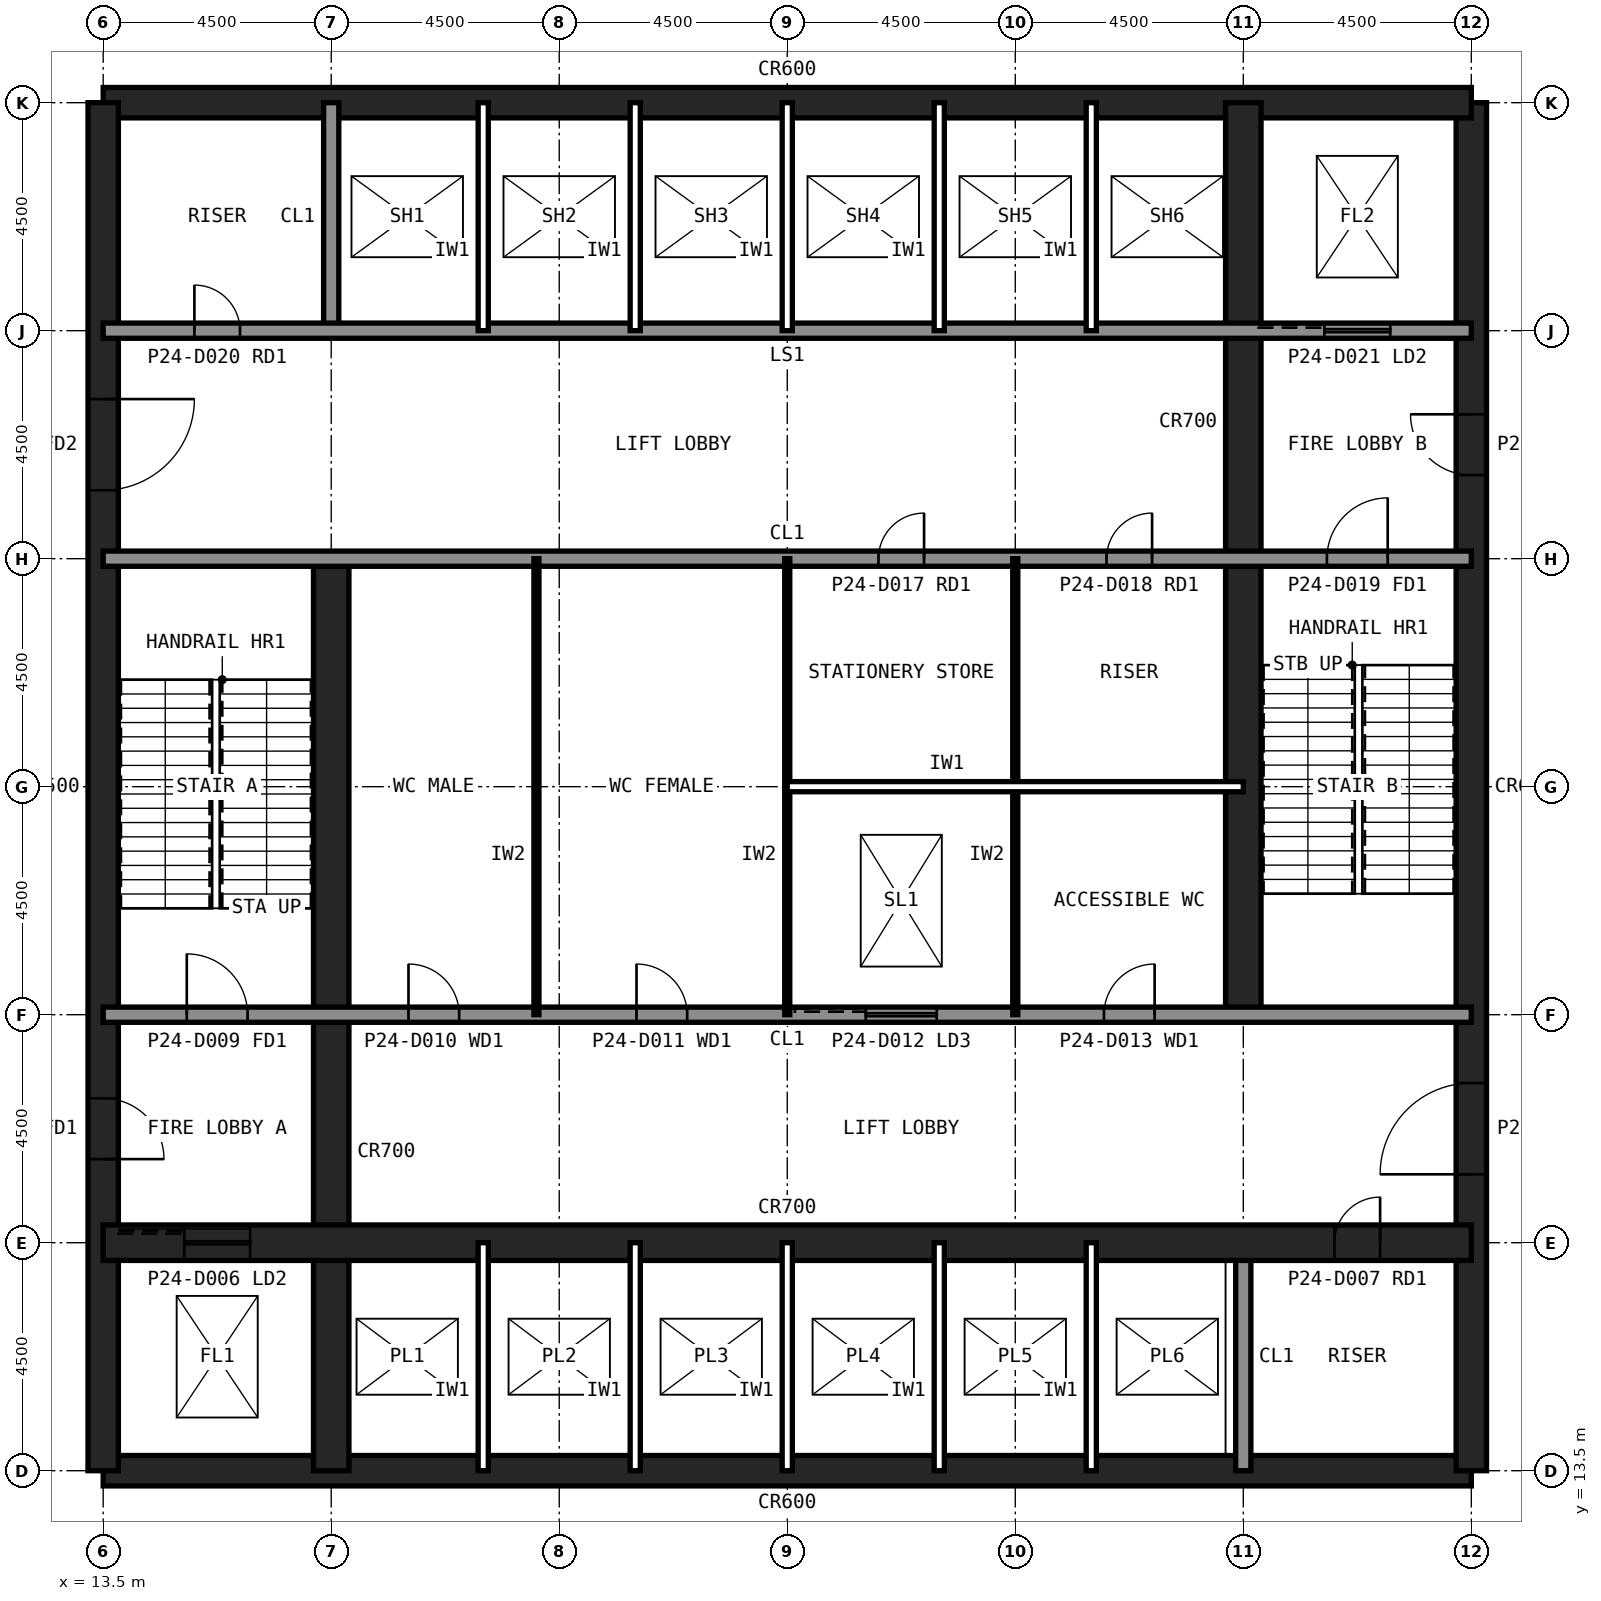
"""IFC4 building model, lengths in metres.
Left out: names, types, materials, properties, quantities, classifications, styles, units other than length and angle.
Written with IfcOpenShell. Run it as: python <this file> out.ifc"""

import sys

from ifc_helpers import new_model, si_unit, direction, frame, frame_2d, origin, place, context, subcontext, project, spatial, rectangle, extrude, element, fill, save


model = new_model("IFC4")
c1 = context("Model", 3, precision=1e-05, world=origin(), true_north=direction((0.0, 1.0)))
c2 = subcontext(c1, "Body", "Model", "MODEL_VIEW")
j1 = project(units=[si_unit("LENGTHUNIT", "METRE"), si_unit("PLANEANGLEUNIT", "RADIAN")], contexts=[c1])
p1 = place(None, origin())
s1 = spatial("IfcSite", under=j1, at=p1, CompositionType="ELEMENT")
p2 = place(p1, origin())
s2 = spatial("IfcBuilding", under=s1, at=p2, CompositionType="ELEMENT")
p3 = place(p2, frame((0.0, 0.0, 104.6)))
s3 = spatial("IfcBuildingStorey", under=s2, at=p3, CompositionType="ELEMENT", Elevation=104.6)
p4 = place(p3, frame((13.5, 13.5, 0.0), z_axis=(0.0, 0.0, 1.0), x_axis=(1.0, 0.0, 0.0)))
e1 = element("IfcWall", 1, at=p4, inside=s3, PredefinedType="SHEAR", context=c2, shape_type="SweptSolid", body=[
    extrude(rectangle(XDim=27.0, YDim=0.6, at=frame_2d((13.5, 0.0))), origin(), (0.0, 0.0, 1.0), 6.0),
])
p5 = place(p3, frame((40.5, 13.5, 0.0), z_axis=(0.0, 0.0, 1.0), x_axis=(0.0, 1.0, 0.0)))
e2 = element("IfcWall", 2, at=p5, inside=s3, PredefinedType="SHEAR", context=c2, shape_type="SweptSolid", body=[
    extrude(rectangle(XDim=27.0, YDim=0.6, at=frame_2d((13.5, 0.0))), origin(), (0.0, 0.0, 1.0), 6.0),
])
p6 = place(p5, frame((5.85, 0.0, 0.0)))
e3 = element("IfcOpeningElement", 3, at=p6, cuts=e2, PredefinedType="OPENING", context=c2, shape_type="SweptSolid", body=[
    extrude(rectangle(XDim=1.8, YDim=2.1, at=frame_2d((0.9, 1.05))), frame((0.0, 0.31, 0.0), z_axis=(0.0, -1.0, 0.0), x_axis=(1.0, 0.0, 0.0)), (0.0, 0.0, 1.0), 0.62),
])
p7 = place(p5, frame((19.65, 0.0, 0.0)))
e4 = element("IfcOpeningElement", 4, at=p7, cuts=e2, PredefinedType="OPENING", context=c2, shape_type="SweptSolid", body=[
    extrude(rectangle(XDim=1.2, YDim=2.1, at=frame_2d((0.6, 1.05))), frame((0.0, 0.31, 0.0), z_axis=(0.0, -1.0, 0.0), x_axis=(1.0, 0.0, 0.0)), (0.0, 0.0, 1.0), 0.62),
])
p8 = place(p3, frame((40.5, 40.5, 0.0), z_axis=(0.0, 0.0, 1.0), x_axis=(-1.0, 0.0, 0.0)))
e5 = element("IfcWall", 5, at=p8, inside=s3, PredefinedType="SHEAR", context=c2, shape_type="SweptSolid", body=[
    extrude(rectangle(XDim=27.0, YDim=0.6, at=frame_2d((13.5, 0.0))), origin(), (0.0, 0.0, 1.0), 6.0),
])
p9 = place(p3, frame((13.5, 40.5, 0.0), z_axis=(0.0, 0.0, 1.0), x_axis=(0.0, -1.0, 0.0)))
e6 = element("IfcWall", 6, at=p9, inside=s3, PredefinedType="SHEAR", context=c2, shape_type="SweptSolid", body=[
    extrude(rectangle(XDim=27.0, YDim=0.6, at=frame_2d((13.5, 0.0))), origin(), (0.0, 0.0, 1.0), 6.0),
])
p10 = place(p9, frame((19.65, 0.0, 0.0)))
e7 = element("IfcOpeningElement", 7, at=p10, cuts=e6, PredefinedType="OPENING", context=c2, shape_type="SweptSolid", body=[
    extrude(rectangle(XDim=1.2, YDim=2.1, at=frame_2d((0.6, 1.05))), frame((0.0, 0.31, 0.0), z_axis=(0.0, -1.0, 0.0), x_axis=(1.0, 0.0, 0.0)), (0.0, 0.0, 1.0), 0.62),
])
p11 = place(p9, frame((5.85, 0.0, 0.0)))
e8 = element("IfcOpeningElement", 8, at=p11, cuts=e6, PredefinedType="OPENING", context=c2, shape_type="SweptSolid", body=[
    extrude(rectangle(XDim=1.8, YDim=2.1, at=frame_2d((0.9, 1.05))), frame((0.0, 0.31, 0.0), z_axis=(0.0, -1.0, 0.0), x_axis=(1.0, 0.0, 0.0)), (0.0, 0.0, 1.0), 0.62),
])
p12 = place(p3, frame((18.0, 13.5, 0.0), z_axis=(0.0, 0.0, 1.0), x_axis=(0.0, 1.0, 0.0)))
e9 = element("IfcWall", 9, at=p12, inside=s3, PredefinedType="SHEAR", context=c2, shape_type="SweptSolid", body=[
    extrude(rectangle(XDim=18.0, YDim=0.7, at=frame_2d((9.0, 0.0))), origin(), (0.0, 0.0, 1.0), 6.0),
])
for number, where, z_axis, x_axis in (
    (10, (18.0, 36.0, 0.0), (0.0, 0.0, 1.0), (0.0, 1.0, 0.0)),
    (11, (36.0, 13.5, 0.0), (0.0, 0.0, 1.0), (0.0, 1.0, 0.0)),
):
    element("IfcWall", number, at=place(p3, frame(where, z_axis=z_axis, x_axis=x_axis)), inside=s3, PredefinedType="SOLIDWALL", context=c2, shape_type="SweptSolid", body=[
        extrude(rectangle(XDim=4.5, YDim=0.3, at=frame_2d((2.25, 0.0))), origin(), (0.0, 0.0, 1.0), 5.82),
    ])
p13 = place(p3, frame((36.0, 22.5, 0.0), z_axis=(0.0, 0.0, 1.0), x_axis=(0.0, 1.0, 0.0)))
e12 = element("IfcWall", 12, at=p13, inside=s3, PredefinedType="SHEAR", context=c2, shape_type="SweptSolid", body=[
    extrude(rectangle(XDim=18.0, YDim=0.7, at=frame_2d((9.0, 0.0))), origin(), (0.0, 0.0, 1.0), 6.0),
])
p14 = place(p3, frame((13.5, 18.0, 0.0), z_axis=(0.0, 0.0, 1.0), x_axis=(1.0, 0.0, 0.0)))
e13 = element("IfcWall", 13, at=p14, inside=s3, PredefinedType="SHEAR", context=c2, shape_type="SweptSolid", body=[
    extrude(rectangle(XDim=27.0, YDim=0.7, at=frame_2d((13.5, 0.0))), origin(), (0.0, 0.0, 1.0), 6.0),
])
p15 = place(p14, frame((24.3, 0.0, 0.0)))
e14 = element("IfcOpeningElement", 14, at=p15, cuts=e13, PredefinedType="OPENING", context=c2, shape_type="SweptSolid", body=[
    extrude(rectangle(XDim=0.9, YDim=2.1, at=frame_2d((0.45, 1.05))), frame((0.0, 0.36, 0.0), z_axis=(0.0, -1.0, 0.0), x_axis=(1.0, 0.0, 0.0)), (0.0, 0.0, 1.0), 0.72),
])
p16 = place(p14, frame((1.6, 0.0, 0.0)))
e15 = element("IfcOpeningElement", 15, at=p16, cuts=e13, PredefinedType="OPENING", context=c2, shape_type="SweptSolid", body=[
    extrude(rectangle(XDim=1.3, YDim=2.2, at=frame_2d((0.65, 1.1))), frame((0.0, 0.36, 0.0), z_axis=(0.0, -1.0, 0.0), x_axis=(1.0, 0.0, 0.0)), (0.0, 0.0, 1.0), 0.72),
])
p17 = place(p3, frame((13.5, 36.0, 0.0), z_axis=(0.0, 0.0, 1.0), x_axis=(1.0, 0.0, 0.0)))
e16 = element("IfcWall", 16, at=p17, inside=s3, PredefinedType="SOLIDWALL", context=c2, shape_type="SweptSolid", body=[
    extrude(rectangle(XDim=27.0, YDim=0.3, at=frame_2d((13.5, 0.0))), origin(), (0.0, 0.0, 1.0), 5.82),
])
p18 = place(p17, frame((1.8, 0.0, 0.0)))
e17 = element("IfcOpeningElement", 17, at=p18, cuts=e16, PredefinedType="OPENING", context=c2, shape_type="SweptSolid", body=[
    extrude(rectangle(XDim=0.9, YDim=2.1, at=frame_2d((0.45, 1.05))), frame((0.0, 0.16, 0.0), z_axis=(0.0, -1.0, 0.0), x_axis=(1.0, 0.0, 0.0)), (0.0, 0.0, 1.0), 0.32),
])
p19 = place(p17, frame((24.1, 0.0, 0.0)))
e18 = element("IfcOpeningElement", 18, at=p19, cuts=e16, PredefinedType="OPENING", context=c2, shape_type="SweptSolid", body=[
    extrude(rectangle(XDim=1.3, YDim=2.2, at=frame_2d((0.65, 1.1))), frame((0.0, 0.16, 0.0), z_axis=(0.0, -1.0, 0.0), x_axis=(1.0, 0.0, 0.0)), (0.0, 0.0, 1.0), 0.32),
])
p20 = place(p3, frame((13.5, 22.5, 0.0), z_axis=(0.0, 0.0, 1.0), x_axis=(1.0, 0.0, 0.0)))
e19 = element("IfcWall", 19, at=p20, inside=s3, PredefinedType="SOLIDWALL", context=c2, shape_type="SweptSolid", body=[
    extrude(rectangle(XDim=27.0, YDim=0.3, at=frame_2d((13.5, 0.0))), origin(), (0.0, 0.0, 1.0), 5.82),
])
p21 = place(p20, frame((1.65, 0.0, 0.0)))
e20 = element("IfcOpeningElement", 20, at=p21, cuts=e19, PredefinedType="OPENING", context=c2, shape_type="SweptSolid", body=[
    extrude(rectangle(XDim=1.2, YDim=2.1, at=frame_2d((0.6, 1.05))), frame((0.0, 0.16, 0.0), z_axis=(0.0, -1.0, 0.0), x_axis=(1.0, 0.0, 0.0)), (0.0, 0.0, 1.0), 0.32),
])
p22 = place(p20, frame((6.025, 0.0, 0.0)))
e21 = element("IfcOpeningElement", 21, at=p22, cuts=e19, PredefinedType="OPENING", context=c2, shape_type="SweptSolid", body=[
    extrude(rectangle(XDim=1.0, YDim=2.1, at=frame_2d((0.5, 1.05))), frame((0.0, 0.16, 0.0), z_axis=(0.0, -1.0, 0.0), x_axis=(1.0, 0.0, 0.0)), (0.0, 0.0, 1.0), 0.32),
])
p23 = place(p20, frame((10.525, 0.0, 0.0)))
e22 = element("IfcOpeningElement", 22, at=p23, cuts=e19, PredefinedType="OPENING", context=c2, shape_type="SweptSolid", body=[
    extrude(rectangle(XDim=1.0, YDim=2.1, at=frame_2d((0.5, 1.05))), frame((0.0, 0.16, 0.0), z_axis=(0.0, -1.0, 0.0), x_axis=(1.0, 0.0, 0.0)), (0.0, 0.0, 1.0), 0.32),
])
p24 = place(p20, frame((19.75, 0.0, 0.0)))
e23 = element("IfcOpeningElement", 23, at=p24, cuts=e19, PredefinedType="OPENING", context=c2, shape_type="SweptSolid", body=[
    extrude(rectangle(XDim=1.0, YDim=2.1, at=frame_2d((0.5, 1.05))), frame((0.0, 0.16, 0.0), z_axis=(0.0, -1.0, 0.0), x_axis=(1.0, 0.0, 0.0)), (0.0, 0.0, 1.0), 0.32),
])
p25 = place(p20, frame((15.05, 0.0, 0.0)))
e24 = element("IfcOpeningElement", 24, at=p25, cuts=e19, PredefinedType="OPENING", context=c2, shape_type="SweptSolid", body=[
    extrude(rectangle(XDim=1.4, YDim=2.4, at=frame_2d((0.7, 1.2))), frame((0.0, 0.16, 0.0), z_axis=(0.0, -1.0, 0.0), x_axis=(1.0, 0.0, 0.0)), (0.0, 0.0, 1.0), 0.32),
])
p26 = place(p3, frame((13.5, 31.5, 0.0), z_axis=(0.0, 0.0, 1.0), x_axis=(1.0, 0.0, 0.0)))
e25 = element("IfcWall", 25, at=p26, inside=s3, PredefinedType="SOLIDWALL", context=c2, shape_type="SweptSolid", body=[
    extrude(rectangle(XDim=27.0, YDim=0.3, at=frame_2d((13.5, 0.0))), origin(), (0.0, 0.0, 1.0), 5.82),
])
p27 = place(p26, frame((24.15, 0.0, 0.0)))
e26 = element("IfcOpeningElement", 26, at=p27, cuts=e25, PredefinedType="OPENING", context=c2, shape_type="SweptSolid", body=[
    extrude(rectangle(XDim=1.2, YDim=2.1, at=frame_2d((0.6, 1.05))), frame((0.0, 0.16, 0.0), z_axis=(0.0, -1.0, 0.0), x_axis=(1.0, 0.0, 0.0)), (0.0, 0.0, 1.0), 0.32),
])
p28 = place(p26, frame((15.3, 0.0, 0.0)))
e27 = element("IfcOpeningElement", 27, at=p28, cuts=e25, PredefinedType="OPENING", context=c2, shape_type="SweptSolid", body=[
    extrude(rectangle(XDim=0.9, YDim=2.1, at=frame_2d((0.45, 1.05))), frame((0.0, 0.16, 0.0), z_axis=(0.0, -1.0, 0.0), x_axis=(1.0, 0.0, 0.0)), (0.0, 0.0, 1.0), 0.32),
])
p29 = place(p26, frame((19.8, 0.0, 0.0)))
e28 = element("IfcOpeningElement", 28, at=p29, cuts=e25, PredefinedType="OPENING", context=c2, shape_type="SweptSolid", body=[
    extrude(rectangle(XDim=0.9, YDim=2.1, at=frame_2d((0.45, 1.05))), frame((0.0, 0.16, 0.0), z_axis=(0.0, -1.0, 0.0), x_axis=(1.0, 0.0, 0.0)), (0.0, 0.0, 1.0), 0.32),
])
for number, where, z_axis, x_axis in (
    (29, (21.0, 13.5, 0.0), (0.0, 0.0, 1.0), (0.0, 1.0, 0.0)),
    (30, (21.0, 36.0, 0.0), (0.0, 0.0, 1.0), (0.0, 1.0, 0.0)),
    (31, (24.0, 13.5, 0.0), (0.0, 0.0, 1.0), (0.0, 1.0, 0.0)),
    (32, (24.0, 36.0, 0.0), (0.0, 0.0, 1.0), (0.0, 1.0, 0.0)),
    (33, (27.0, 13.5, 0.0), (0.0, 0.0, 1.0), (0.0, 1.0, 0.0)),
    (34, (27.0, 36.0, 0.0), (0.0, 0.0, 1.0), (0.0, 1.0, 0.0)),
    (35, (30.0, 13.5, 0.0), (0.0, 0.0, 1.0), (0.0, 1.0, 0.0)),
    (36, (30.0, 36.0, 0.0), (0.0, 0.0, 1.0), (0.0, 1.0, 0.0)),
    (37, (33.0, 13.5, 0.0), (0.0, 0.0, 1.0), (0.0, 1.0, 0.0)),
    (38, (33.0, 36.0, 0.0), (0.0, 0.0, 1.0), (0.0, 1.0, 0.0)),
):
    element("IfcWall", number, at=place(p3, frame(where, z_axis=z_axis, x_axis=x_axis)), inside=s3, PredefinedType="PARTITIONING", context=c2, shape_type="SweptSolid", body=[
        extrude(rectangle(XDim=4.5, YDim=0.2, at=frame_2d((2.25, 0.0))), origin(), (0.0, 0.0, 1.0), 5.82),
    ])
for number, where, z_axis, x_axis in (
    (39, (22.05, 22.5, 0.0), (0.0, 0.0, 1.0), (0.0, 1.0, 0.0)),
    (40, (27.0, 22.5, 0.0), (0.0, 0.0, 1.0), (0.0, 1.0, 0.0)),
    (41, (31.5, 22.5, 0.0), (0.0, 0.0, 1.0), (0.0, 1.0, 0.0)),
):
    element("IfcWall", number, at=place(p3, frame(where, z_axis=z_axis, x_axis=x_axis)), inside=s3, PredefinedType="PLUMBINGWALL", context=c2, shape_type="SweptSolid", body=[
        extrude(rectangle(XDim=9.0, YDim=0.1, at=frame_2d((4.5, 0.0))), origin(), (0.0, 0.0, 1.0), 5.82),
    ])
p30 = place(p3, frame((27.0, 27.0, 0.0), z_axis=(0.0, 0.0, 1.0), x_axis=(1.0, 0.0, 0.0)))
e42 = element("IfcWall", 42, at=p30, inside=s3, PredefinedType="PARTITIONING", context=c2, shape_type="SweptSolid", body=[
    extrude(rectangle(XDim=9.0, YDim=0.2, at=frame_2d((4.5, 0.0))), origin(), (0.0, 0.0, 1.0), 5.82),
])
p31 = place(p10, origin())
e43 = element("IfcDoor", 43, at=p31, inside=s3, OperationType="SINGLE_SWING_RIGHT", PredefinedType="DOOR", context=c2, shape_type="SweptSolid", body=[
    extrude(rectangle(XDim=1.2, YDim=2.1, at=frame_2d((0.6, 1.05))), frame((0.0, 0.025, 0.0), z_axis=(0.0, -1.0, 0.0), x_axis=(1.0, 0.0, 0.0)), (0.0, 0.0, 1.0), 0.05),
])
fill(e7, e43)
p32 = place(p11, origin())
e44 = element("IfcDoor", 44, at=p32, inside=s3, OperationType="SINGLE_SWING_LEFT", PredefinedType="DOOR", context=c2, shape_type="SweptSolid", body=[
    extrude(rectangle(XDim=1.8, YDim=2.1, at=frame_2d((0.9, 1.05))), frame((0.0, 0.025, 0.0), z_axis=(0.0, -1.0, 0.0), x_axis=(1.0, 0.0, 0.0)), (0.0, 0.0, 1.0), 0.05),
])
fill(e8, e44)
p33 = place(p6, origin())
e45 = element("IfcDoor", 45, at=p33, inside=s3, OperationType="SINGLE_SWING_LEFT", PredefinedType="DOOR", context=c2, shape_type="SweptSolid", body=[
    extrude(rectangle(XDim=1.8, YDim=2.1, at=frame_2d((0.9, 1.05))), frame((0.0, 0.025, 0.0), z_axis=(0.0, -1.0, 0.0), x_axis=(1.0, 0.0, 0.0)), (0.0, 0.0, 1.0), 0.05),
])
fill(e3, e45)
p34 = place(p7, origin())
e46 = element("IfcDoor", 46, at=p34, inside=s3, OperationType="SINGLE_SWING_RIGHT", PredefinedType="DOOR", context=c2, shape_type="SweptSolid", body=[
    extrude(rectangle(XDim=1.2, YDim=2.1, at=frame_2d((0.6, 1.05))), frame((0.0, 0.025, 0.0), z_axis=(0.0, -1.0, 0.0), x_axis=(1.0, 0.0, 0.0)), (0.0, 0.0, 1.0), 0.05),
])
fill(e4, e46)
p35 = place(p21, origin())
e47 = element("IfcDoor", 47, at=p35, inside=s3, OperationType="SINGLE_SWING_LEFT", PredefinedType="DOOR", context=c2, shape_type="SweptSolid", body=[
    extrude(rectangle(XDim=1.2, YDim=2.1, at=frame_2d((0.6, 1.05))), frame((0.0, 0.025, 0.0), z_axis=(0.0, -1.0, 0.0), x_axis=(1.0, 0.0, 0.0)), (0.0, 0.0, 1.0), 0.05),
])
fill(e20, e47)
p36 = place(p27, origin())
e48 = element("IfcDoor", 48, at=p36, inside=s3, OperationType="SINGLE_SWING_RIGHT", PredefinedType="DOOR", context=c2, shape_type="SweptSolid", body=[
    extrude(rectangle(XDim=1.2, YDim=2.1, at=frame_2d((0.6, 1.05))), frame((0.0, 0.025, 0.0), z_axis=(0.0, -1.0, 0.0), x_axis=(1.0, 0.0, 0.0)), (0.0, 0.0, 1.0), 0.05),
])
fill(e26, e48)
p37 = place(p22, origin())
e49 = element("IfcDoor", 49, at=p37, inside=s3, OperationType="SINGLE_SWING_LEFT", PredefinedType="DOOR", context=c2, shape_type="SweptSolid", body=[
    extrude(rectangle(XDim=1.0, YDim=2.1, at=frame_2d((0.5, 1.05))), frame((0.0, 0.025, 0.0), z_axis=(0.0, -1.0, 0.0), x_axis=(1.0, 0.0, 0.0)), (0.0, 0.0, 1.0), 0.05),
])
fill(e21, e49)
p38 = place(p23, origin())
e50 = element("IfcDoor", 50, at=p38, inside=s3, OperationType="SINGLE_SWING_LEFT", PredefinedType="DOOR", context=c2, shape_type="SweptSolid", body=[
    extrude(rectangle(XDim=1.0, YDim=2.1, at=frame_2d((0.5, 1.05))), frame((0.0, 0.025, 0.0), z_axis=(0.0, -1.0, 0.0), x_axis=(1.0, 0.0, 0.0)), (0.0, 0.0, 1.0), 0.05),
])
fill(e22, e50)
p39 = place(p24, origin())
e51 = element("IfcDoor", 51, at=p39, inside=s3, OperationType="SINGLE_SWING_RIGHT", PredefinedType="DOOR", context=c2, shape_type="SweptSolid", body=[
    extrude(rectangle(XDim=1.0, YDim=2.1, at=frame_2d((0.5, 1.05))), frame((0.0, 0.025, 0.0), z_axis=(0.0, -1.0, 0.0), x_axis=(1.0, 0.0, 0.0)), (0.0, 0.0, 1.0), 0.05),
])
fill(e23, e51)
p40 = place(p28, origin())
e52 = element("IfcDoor", 52, at=p40, inside=s3, OperationType="SINGLE_SWING_RIGHT", PredefinedType="DOOR", context=c2, shape_type="SweptSolid", body=[
    extrude(rectangle(XDim=0.9, YDim=2.1, at=frame_2d((0.45, 1.05))), frame((0.0, 0.025, 0.0), z_axis=(0.0, -1.0, 0.0), x_axis=(1.0, 0.0, 0.0)), (0.0, 0.0, 1.0), 0.05),
])
fill(e27, e52)
p41 = place(p29, origin())
e53 = element("IfcDoor", 53, at=p41, inside=s3, OperationType="SINGLE_SWING_RIGHT", PredefinedType="DOOR", context=c2, shape_type="SweptSolid", body=[
    extrude(rectangle(XDim=0.9, YDim=2.1, at=frame_2d((0.45, 1.05))), frame((0.0, 0.025, 0.0), z_axis=(0.0, -1.0, 0.0), x_axis=(1.0, 0.0, 0.0)), (0.0, 0.0, 1.0), 0.05),
])
fill(e28, e53)
p42 = place(p15, origin())
e54 = element("IfcDoor", 54, at=p42, inside=s3, OperationType="SINGLE_SWING_RIGHT", PredefinedType="DOOR", context=c2, shape_type="SweptSolid", body=[
    extrude(rectangle(XDim=0.9, YDim=2.1, at=frame_2d((0.45, 1.05))), frame((0.0, 0.025, 0.0), z_axis=(0.0, -1.0, 0.0), x_axis=(1.0, 0.0, 0.0)), (0.0, 0.0, 1.0), 0.05),
])
fill(e14, e54)
p43 = place(p18, origin())
e55 = element("IfcDoor", 55, at=p43, inside=s3, OperationType="SINGLE_SWING_LEFT", PredefinedType="DOOR", context=c2, shape_type="SweptSolid", body=[
    extrude(rectangle(XDim=0.9, YDim=2.1, at=frame_2d((0.45, 1.05))), frame((0.0, 0.025, 0.0), z_axis=(0.0, -1.0, 0.0), x_axis=(1.0, 0.0, 0.0)), (0.0, 0.0, 1.0), 0.05),
])
fill(e17, e55)
p44 = place(p16, origin())
e56 = element("IfcDoor", 56, at=p44, inside=s3, OperationType="SLIDING_TO_LEFT", PredefinedType="DOOR", context=c2, shape_type="SweptSolid", body=[
    extrude(rectangle(XDim=1.3, YDim=2.2, at=frame_2d((0.65, 1.1))), frame((0.0, 0.025, 0.0), z_axis=(0.0, -1.0, 0.0), x_axis=(1.0, 0.0, 0.0)), (0.0, 0.0, 1.0), 0.05),
])
fill(e15, e56)
p45 = place(p19, origin())
e57 = element("IfcDoor", 57, at=p45, inside=s3, OperationType="SLIDING_TO_LEFT", PredefinedType="DOOR", context=c2, shape_type="SweptSolid", body=[
    extrude(rectangle(XDim=1.3, YDim=2.2, at=frame_2d((0.65, 1.1))), frame((0.0, 0.025, 0.0), z_axis=(0.0, -1.0, 0.0), x_axis=(1.0, 0.0, 0.0)), (0.0, 0.0, 1.0), 0.05),
])
fill(e18, e57)
p46 = place(p25, origin())
e58 = element("IfcDoor", 58, at=p46, inside=s3, OperationType="SLIDING_TO_LEFT", PredefinedType="DOOR", context=c2, shape_type="SweptSolid", body=[
    extrude(rectangle(XDim=1.4, YDim=2.4, at=frame_2d((0.7, 1.2))), frame((0.0, 0.025, 0.0), z_axis=(0.0, -1.0, 0.0), x_axis=(1.0, 0.0, 0.0)), (0.0, 0.0, 1.0), 0.05),
])
fill(e24, e58)
save(model, sys.argv[1])
